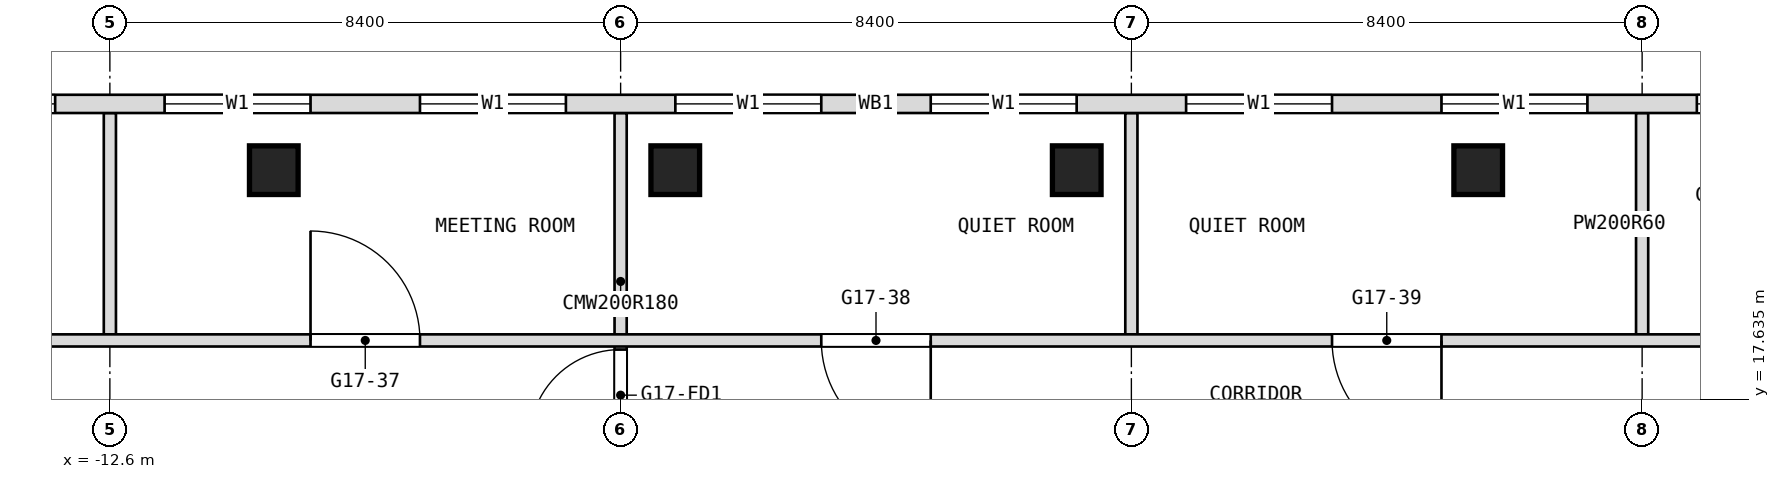
"""IFC4 building model, lengths in metres.
Left out: names, types, materials, properties, quantities, classifications, styles, units other than length and angle.
Written with IfcOpenShell. Run it as: python <this file> out.ifc"""

import sys

from ifc_helpers import new_model, si_unit, direction, frame, frame_2d, origin, origin_2d, place, context, subcontext, project, spatial, rectangle, extrude, element, fill, save


model = new_model("IFC4")
c1 = context("Model", 3, precision=1e-05, world=origin(), true_north=direction((0.0, 1.0)))
c2 = subcontext(c1, "Body", "Model", "MODEL_VIEW")
j1 = project(units=[si_unit("LENGTHUNIT", "METRE"), si_unit("PLANEANGLEUNIT", "RADIAN")], contexts=[c1])
p1 = place(None, origin())
s1 = spatial("IfcSite", under=j1, at=p1, CompositionType="ELEMENT")
p2 = place(p1, origin())
s2 = spatial("IfcBuilding", under=s1, at=p2, CompositionType="ELEMENT")
p3 = place(p2, frame((0.0, 0.0, 212.9)))
s3 = spatial("IfcBuildingStorey", under=s2, at=p3, CompositionType="ELEMENT", Elevation=212.9)
for number, where, z_axis, x_axis in (
    (1, (-9.904, 21.4, 0.0), (0.0, 0.0, 1.0), (1.0, 0.0, 0.0)),
    (2, (-3.302, 21.4, 0.0), (0.0, 0.0, 1.0), (1.0, 0.0, 0.0)),
    (3, (3.302, 21.4, 0.0), (0.0, 0.0, 1.0), (1.0, 0.0, 0.0)),
    (4, (9.904, 21.4, 0.0), (0.0, 0.0, 1.0), (1.0, 0.0, 0.0)),
):
    element("IfcColumn", number, at=place(p3, frame(where, z_axis=z_axis, x_axis=x_axis)), inside=s3, PredefinedType="COLUMN", context=c2, shape_type="SweptSolid", body=[
        extrude(rectangle(XDim=0.8, YDim=0.8, at=origin_2d()), origin(), (0.0, 0.0, 1.0), 3.6),
    ])
for number, where, z_axis, x_axis in (
    (5, (12.6, 18.7, 0.0), (0.0, 0.0, 1.0), (0.0, 1.0, 0.0)),
    (6, (4.2, 18.7, 0.0), (0.0, 0.0, 1.0), (0.0, 1.0, 0.0)),
):
    element("IfcWall", number, at=place(p3, frame(where, z_axis=z_axis, x_axis=x_axis)), inside=s3, PredefinedType="PARTITIONING", context=c2, shape_type="SweptSolid", body=[
        extrude(rectangle(XDim=3.64, YDim=0.2, at=frame_2d((1.82, 0.0))), origin(), (0.0, 0.0, 1.0), 3.34),
    ])
p4 = place(p3, frame((-4.2, 16.8, 0.0), z_axis=(0.0, 0.0, 1.0), x_axis=(0.0, 1.0, 0.0)))
e7 = element("IfcWall", 7, at=p4, inside=s3, PredefinedType="PARTITIONING", context=c2, shape_type="SweptSolid", body=[
    extrude(rectangle(XDim=5.54, YDim=0.2, at=frame_2d((2.77, 0.0))), origin(), (0.0, 0.0, 1.0), 3.34),
])
p5 = place(p4, frame((0.15, 0.0, 0.0)))
e8 = element("IfcOpeningElement", 8, at=p5, cuts=e7, PredefinedType="OPENING", context=c2, shape_type="SweptSolid", body=[
    extrude(rectangle(XDim=1.5, YDim=2.1, at=frame_2d((0.75, 1.05))), frame((0.0, 0.1, 0.0), z_axis=(0.0, -1.0, 0.0), x_axis=(1.0, 0.0, 0.0)), (0.0, 0.0, 1.0), 0.2),
])
p6 = place(p3, frame((-12.6, 18.7, 0.0), z_axis=(0.0, 0.0, 1.0), x_axis=(0.0, 1.0, 0.0)))
e9 = element("IfcWall", 9, at=p6, inside=s3, PredefinedType="PARTITIONING", context=c2, shape_type="SweptSolid", body=[
    extrude(rectangle(XDim=3.64, YDim=0.2, at=frame_2d((1.82, 0.0))), origin(), (0.0, 0.0, 1.0), 3.34),
])
p7 = place(p3, frame((-16.9, 18.6, 0.0), z_axis=(0.0, 0.0, 1.0), x_axis=(1.0, 0.0, 0.0)))
e10 = element("IfcWall", 10, at=p7, inside=s3, PredefinedType="PARTITIONING", context=c2, shape_type="SweptSolid", body=[
    extrude(rectangle(XDim=33.8, YDim=0.2, at=frame_2d((16.9, 0.0))), origin(), (0.0, 0.0, 1.0), 3.34),
])
p8 = place(p7, frame((1.7, 0.0, 0.0)))
e11 = element("IfcOpeningElement", 11, at=p8, cuts=e10, PredefinedType="OPENING", context=c2, shape_type="SweptSolid", body=[
    extrude(rectangle(XDim=1.0, YDim=2.1, at=frame_2d((0.5, 1.05))), frame((0.0, 0.1, 0.0), z_axis=(0.0, -1.0, 0.0), x_axis=(1.0, 0.0, 0.0)), (0.0, 0.0, 1.0), 0.2),
])
p9 = place(p7, frame((7.6, 0.0, 0.0)))
e12 = element("IfcOpeningElement", 12, at=p9, cuts=e10, PredefinedType="OPENING", context=c2, shape_type="SweptSolid", body=[
    extrude(rectangle(XDim=1.8, YDim=2.1, at=frame_2d((0.9, 1.05))), frame((0.0, 0.1, 0.0), z_axis=(0.0, -1.0, 0.0), x_axis=(1.0, 0.0, 0.0)), (0.0, 0.0, 1.0), 0.2),
])
p10 = place(p7, frame((16.0, 0.0, 0.0)))
e13 = element("IfcOpeningElement", 13, at=p10, cuts=e10, PredefinedType="OPENING", context=c2, shape_type="SweptSolid", body=[
    extrude(rectangle(XDim=1.8, YDim=2.1, at=frame_2d((0.9, 1.05))), frame((0.0, 0.1, 0.0), z_axis=(0.0, -1.0, 0.0), x_axis=(1.0, 0.0, 0.0)), (0.0, 0.0, 1.0), 0.2),
])
p11 = place(p7, frame((24.4, 0.0, 0.0)))
e14 = element("IfcOpeningElement", 14, at=p11, cuts=e10, PredefinedType="OPENING", context=c2, shape_type="SweptSolid", body=[
    extrude(rectangle(XDim=1.8, YDim=2.1, at=frame_2d((0.9, 1.05))), frame((0.0, 0.1, 0.0), z_axis=(0.0, -1.0, 0.0), x_axis=(1.0, 0.0, 0.0)), (0.0, 0.0, 1.0), 0.2),
])
p12 = place(p7, frame((31.1, 0.0, 0.0)))
e15 = element("IfcOpeningElement", 15, at=p12, cuts=e10, PredefinedType="OPENING", context=c2, shape_type="SweptSolid", body=[
    extrude(rectangle(XDim=1.0, YDim=2.1, at=frame_2d((0.5, 1.05))), frame((0.0, 0.1, 0.0), z_axis=(0.0, -1.0, 0.0), x_axis=(1.0, 0.0, 0.0)), (0.0, 0.0, 1.0), 0.2),
])
p13 = place(p3, frame((19.206, 22.49, 0.0), z_axis=(0.0, 0.0, 1.0), x_axis=(-1.0, 0.0, 0.0)))
e16 = element("IfcWall", 16, at=p13, inside=s3, PredefinedType="NOTDEFINED", context=c2, shape_type="SweptSolid", body=[
    extrude(rectangle(XDim=38.412, YDim=0.3, at=frame_2d((19.206, 0.0))), origin(), (0.0, 0.0, 1.0), 3.6),
])
p14 = place(p13, frame((3.306, 0.0, 0.9)))
e17 = element("IfcOpeningElement", 17, at=p14, cuts=e16, PredefinedType="OPENING", context=c2, shape_type="SweptSolid", body=[
    extrude(rectangle(XDim=2.4, YDim=2.1, at=frame_2d((1.2, 1.05))), frame((0.0, 0.15, 0.0), z_axis=(0.0, -1.0, 0.0), x_axis=(1.0, 0.0, 0.0)), (0.0, 0.0, 1.0), 0.3),
])
p15 = place(p13, frame((7.506, 0.0, 0.9)))
e18 = element("IfcOpeningElement", 18, at=p15, cuts=e16, PredefinedType="OPENING", context=c2, shape_type="SweptSolid", body=[
    extrude(rectangle(XDim=2.4, YDim=2.1, at=frame_2d((1.2, 1.05))), frame((0.0, 0.15, 0.0), z_axis=(0.0, -1.0, 0.0), x_axis=(1.0, 0.0, 0.0)), (0.0, 0.0, 1.0), 0.3),
])
p16 = place(p13, frame((11.706, 0.0, 0.9)))
e19 = element("IfcOpeningElement", 19, at=p16, cuts=e16, PredefinedType="OPENING", context=c2, shape_type="SweptSolid", body=[
    extrude(rectangle(XDim=2.4, YDim=2.1, at=frame_2d((1.2, 1.05))), frame((0.0, 0.15, 0.0), z_axis=(0.0, -1.0, 0.0), x_axis=(1.0, 0.0, 0.0)), (0.0, 0.0, 1.0), 0.3),
])
p17 = place(p13, frame((15.906, 0.0, 0.9)))
e20 = element("IfcOpeningElement", 20, at=p17, cuts=e16, PredefinedType="OPENING", context=c2, shape_type="SweptSolid", body=[
    extrude(rectangle(XDim=2.4, YDim=2.1, at=frame_2d((1.2, 1.05))), frame((0.0, 0.15, 0.0), z_axis=(0.0, -1.0, 0.0), x_axis=(1.0, 0.0, 0.0)), (0.0, 0.0, 1.0), 0.3),
])
p18 = place(p13, frame((20.106, 0.0, 0.9)))
e21 = element("IfcOpeningElement", 21, at=p18, cuts=e16, PredefinedType="OPENING", context=c2, shape_type="SweptSolid", body=[
    extrude(rectangle(XDim=2.4, YDim=2.1, at=frame_2d((1.2, 1.05))), frame((0.0, 0.15, 0.0), z_axis=(0.0, -1.0, 0.0), x_axis=(1.0, 0.0, 0.0)), (0.0, 0.0, 1.0), 0.3),
])
p19 = place(p13, frame((24.306, 0.0, 0.9)))
e22 = element("IfcOpeningElement", 22, at=p19, cuts=e16, PredefinedType="OPENING", context=c2, shape_type="SweptSolid", body=[
    extrude(rectangle(XDim=2.4, YDim=2.1, at=frame_2d((1.2, 1.05))), frame((0.0, 0.15, 0.0), z_axis=(0.0, -1.0, 0.0), x_axis=(1.0, 0.0, 0.0)), (0.0, 0.0, 1.0), 0.3),
])
p20 = place(p13, frame((28.506, 0.0, 0.9)))
e23 = element("IfcOpeningElement", 23, at=p20, cuts=e16, PredefinedType="OPENING", context=c2, shape_type="SweptSolid", body=[
    extrude(rectangle(XDim=2.4, YDim=2.1, at=frame_2d((1.2, 1.05))), frame((0.0, 0.15, 0.0), z_axis=(0.0, -1.0, 0.0), x_axis=(1.0, 0.0, 0.0)), (0.0, 0.0, 1.0), 0.3),
])
p21 = place(p13, frame((32.706, 0.0, 0.9)))
e24 = element("IfcOpeningElement", 24, at=p21, cuts=e16, PredefinedType="OPENING", context=c2, shape_type="SweptSolid", body=[
    extrude(rectangle(XDim=2.4, YDim=2.1, at=frame_2d((1.2, 1.05))), frame((0.0, 0.15, 0.0), z_axis=(0.0, -1.0, 0.0), x_axis=(1.0, 0.0, 0.0)), (0.0, 0.0, 1.0), 0.3),
])
p22 = place(p9, origin())
e25 = element("IfcDoor", 25, at=p22, inside=s3, OperationType="DOUBLE_DOOR_SINGLE_SWING", PredefinedType="DOOR", context=c2, shape_type="SweptSolid", body=[
    extrude(rectangle(XDim=1.8, YDim=2.1, at=frame_2d((0.9, 1.05))), frame((0.0, 0.025, 0.0), z_axis=(0.0, -1.0, 0.0), x_axis=(1.0, 0.0, 0.0)), (0.0, 0.0, 1.0), 0.05),
])
fill(e12, e25)
p23 = place(p10, origin())
e26 = element("IfcDoor", 26, at=p23, inside=s3, OperationType="DOUBLE_DOOR_SINGLE_SWING", PredefinedType="DOOR", context=c2, shape_type="SweptSolid", body=[
    extrude(rectangle(XDim=1.8, YDim=2.1, at=frame_2d((0.9, 1.05))), frame((0.0, 0.025, 0.0), z_axis=(0.0, -1.0, 0.0), x_axis=(1.0, 0.0, 0.0)), (0.0, 0.0, 1.0), 0.05),
])
fill(e13, e26)
p24 = place(p11, origin())
e27 = element("IfcDoor", 27, at=p24, inside=s3, OperationType="DOUBLE_DOOR_SINGLE_SWING", PredefinedType="DOOR", context=c2, shape_type="SweptSolid", body=[
    extrude(rectangle(XDim=1.8, YDim=2.1, at=frame_2d((0.9, 1.05))), frame((0.0, 0.025, 0.0), z_axis=(0.0, -1.0, 0.0), x_axis=(1.0, 0.0, 0.0)), (0.0, 0.0, 1.0), 0.05),
])
fill(e14, e27)
p25 = place(p14, origin())
e28 = element("IfcWindow", 28, at=p25, inside=s3, PartitioningType="SINGLE_PANEL", PredefinedType="WINDOW", context=c2, shape_type="SweptSolid", body=[
    extrude(rectangle(XDim=2.4, YDim=2.1, at=frame_2d((1.2, 1.05))), frame((0.0, 0.03, 0.0), z_axis=(0.0, -1.0, 0.0), x_axis=(1.0, 0.0, 0.0)), (0.0, 0.0, 1.0), 0.06),
])
fill(e17, e28)
p26 = place(p15, origin())
e29 = element("IfcWindow", 29, at=p26, inside=s3, PartitioningType="SINGLE_PANEL", PredefinedType="WINDOW", context=c2, shape_type="SweptSolid", body=[
    extrude(rectangle(XDim=2.4, YDim=2.1, at=frame_2d((1.2, 1.05))), frame((0.0, 0.03, 0.0), z_axis=(0.0, -1.0, 0.0), x_axis=(1.0, 0.0, 0.0)), (0.0, 0.0, 1.0), 0.06),
])
fill(e18, e29)
p27 = place(p16, origin())
e30 = element("IfcWindow", 30, at=p27, inside=s3, PartitioningType="SINGLE_PANEL", PredefinedType="WINDOW", context=c2, shape_type="SweptSolid", body=[
    extrude(rectangle(XDim=2.4, YDim=2.1, at=frame_2d((1.2, 1.05))), frame((0.0, 0.03, 0.0), z_axis=(0.0, -1.0, 0.0), x_axis=(1.0, 0.0, 0.0)), (0.0, 0.0, 1.0), 0.06),
])
fill(e19, e30)
p28 = place(p17, origin())
e31 = element("IfcWindow", 31, at=p28, inside=s3, PartitioningType="SINGLE_PANEL", PredefinedType="WINDOW", context=c2, shape_type="SweptSolid", body=[
    extrude(rectangle(XDim=2.4, YDim=2.1, at=frame_2d((1.2, 1.05))), frame((0.0, 0.03, 0.0), z_axis=(0.0, -1.0, 0.0), x_axis=(1.0, 0.0, 0.0)), (0.0, 0.0, 1.0), 0.06),
])
fill(e20, e31)
p29 = place(p18, origin())
e32 = element("IfcWindow", 32, at=p29, inside=s3, PartitioningType="SINGLE_PANEL", PredefinedType="WINDOW", context=c2, shape_type="SweptSolid", body=[
    extrude(rectangle(XDim=2.4, YDim=2.1, at=frame_2d((1.2, 1.05))), frame((0.0, 0.03, 0.0), z_axis=(0.0, -1.0, 0.0), x_axis=(1.0, 0.0, 0.0)), (0.0, 0.0, 1.0), 0.06),
])
fill(e21, e32)
p30 = place(p19, origin())
e33 = element("IfcWindow", 33, at=p30, inside=s3, PartitioningType="SINGLE_PANEL", PredefinedType="WINDOW", context=c2, shape_type="SweptSolid", body=[
    extrude(rectangle(XDim=2.4, YDim=2.1, at=frame_2d((1.2, 1.05))), frame((0.0, 0.03, 0.0), z_axis=(0.0, -1.0, 0.0), x_axis=(1.0, 0.0, 0.0)), (0.0, 0.0, 1.0), 0.06),
])
fill(e22, e33)
p31 = place(p20, origin())
e34 = element("IfcWindow", 34, at=p31, inside=s3, PartitioningType="SINGLE_PANEL", PredefinedType="WINDOW", context=c2, shape_type="SweptSolid", body=[
    extrude(rectangle(XDim=2.4, YDim=2.1, at=frame_2d((1.2, 1.05))), frame((0.0, 0.03, 0.0), z_axis=(0.0, -1.0, 0.0), x_axis=(1.0, 0.0, 0.0)), (0.0, 0.0, 1.0), 0.06),
])
fill(e23, e34)
p32 = place(p21, origin())
e35 = element("IfcWindow", 35, at=p32, inside=s3, PartitioningType="SINGLE_PANEL", PredefinedType="WINDOW", context=c2, shape_type="SweptSolid", body=[
    extrude(rectangle(XDim=2.4, YDim=2.1, at=frame_2d((1.2, 1.05))), frame((0.0, 0.03, 0.0), z_axis=(0.0, -1.0, 0.0), x_axis=(1.0, 0.0, 0.0)), (0.0, 0.0, 1.0), 0.06),
])
fill(e24, e35)
p33 = place(p5, origin())
e36 = element("IfcDoor", 36, at=p33, inside=s3, OperationType="DOUBLE_DOOR_DOUBLE_SWING", PredefinedType="DOOR", context=c2, shape_type="SweptSolid", body=[
    extrude(rectangle(XDim=1.5, YDim=2.1, at=frame_2d((0.75, 1.05))), frame((0.0, 0.025, 0.0), z_axis=(0.0, -1.0, 0.0), x_axis=(1.0, 0.0, 0.0)), (0.0, 0.0, 1.0), 0.05),
])
fill(e8, e36)
save(model, sys.argv[1])
